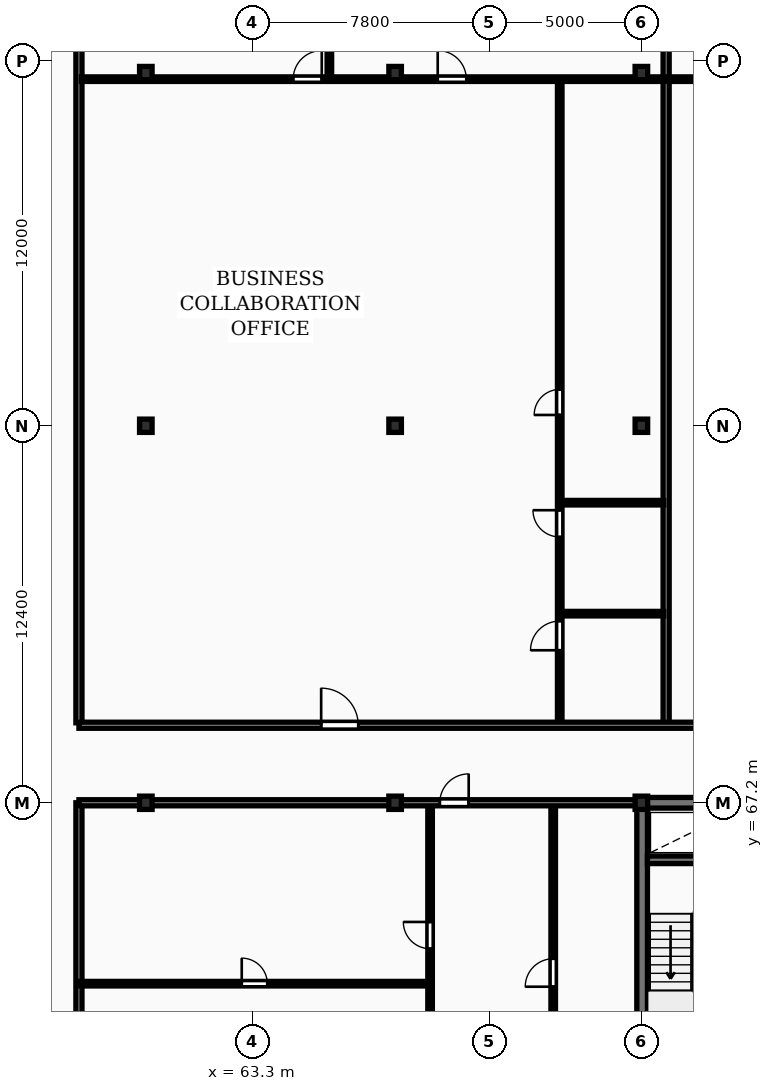
"""IFC4 building model, lengths in metres.
Left out: names, types, materials, properties, quantities, classifications, styles, units other than length and angle.
Written with IfcOpenShell. Run it as: python <this file> out.ifc"""

import sys

from ifc_helpers import new_model, si_unit, direction, frame, frame_2d, origin, origin_2d, place, context, subcontext, project, spatial, rectangle, i_section, extrude, element, fill, save


model = new_model("IFC4")
c1 = context("Model", 3, precision=1e-05, world=origin(), true_north=direction((0.0, 1.0)))
c2 = subcontext(c1, "Body", "Model", "MODEL_VIEW")
j1 = project(units=[si_unit("LENGTHUNIT", "METRE"), si_unit("PLANEANGLEUNIT", "RADIAN")], contexts=[c1])
p1 = place(None, origin())
s1 = spatial("IfcSite", under=j1, at=p1, CompositionType="ELEMENT")
p2 = place(p1, origin())
s2 = spatial("IfcBuilding", under=s1, at=p2, CompositionType="ELEMENT")
p3 = place(p2, frame((0.0, 0.0, 139.3)))
s3 = spatial("IfcBuildingStorey", under=s2, at=p3, CompositionType="ELEMENT", Elevation=139.3)
for number, where, z_axis, x_axis in (
    (1, (59.8, 67.2, 0.0), (0.0, 0.0, 1.0), (1.0, 0.0, 0.0)),
    (2, (59.8, 79.6, 0.0), (0.0, 0.0, 1.0), (1.0, 0.0, 0.0)),
    (3, (59.8, 91.2, 0.0), (0.0, 0.0, 1.0), (1.0, 0.0, 0.0)),
    (4, (68.0, 67.2, 0.0), (0.0, 0.0, 1.0), (1.0, 0.0, 0.0)),
    (5, (68.0, 79.6, 0.0), (0.0, 0.0, 1.0), (1.0, 0.0, 0.0)),
    (6, (68.0, 91.2, 0.0), (0.0, 0.0, 1.0), (1.0, 0.0, 0.0)),
    (7, (76.1, 67.2, 0.0), (0.0, 0.0, 1.0), (1.0, 0.0, 0.0)),
    (8, (76.1, 79.6, 0.0), (0.0, 0.0, 1.0), (1.0, 0.0, 0.0)),
    (9, (76.1, 91.2, 0.0), (0.0, 0.0, 1.0), (1.0, 0.0, 0.0)),
):
    element("IfcColumn", number, at=place(p3, frame(where, z_axis=z_axis, x_axis=x_axis)), inside=s3, PredefinedType="COLUMN", context=c2, shape_type="SweptSolid", body=[
        extrude(i_section(OverallWidth=0.412, OverallDepth=0.437, WebThickness=0.036, FlangeThickness=0.052, FilletRadius=0.015, at=origin_2d()), origin(), (0.0, 0.0, 1.0), 3.6),
    ])
p4 = place(p3, frame((76.125, 55.375, 0.0), z_axis=(0.0, 0.0, 1.0), x_axis=(0.0, 1.0, 0.0)))
e10 = element("IfcWall", 10, at=p4, inside=s3, PredefinedType="SHEAR", context=c2, shape_type="SweptSolid", body=[
    extrude(rectangle(XDim=11.65, YDim=0.35, at=frame_2d((5.825, 0.0))), origin(), (0.0, 0.0, 1.0), 3.6),
])
p5 = place(p3, frame((75.95, 67.2, 0.0), z_axis=(0.0, 0.0, 1.0), x_axis=(1.0, 0.0, 0.0)))
e11 = element("IfcWall", 11, at=p5, inside=s3, PredefinedType="SHEAR", context=c2, shape_type="SweptSolid", body=[
    extrude(rectangle(XDim=36.3, YDim=0.35, at=frame_2d((18.15, 0.0))), origin(), (0.0, 0.0, 1.0), 3.6),
])
p6 = place(p5, frame((5.25, 0.0, 0.0)))
e12 = element("IfcOpeningElement", 12, at=p6, cuts=e11, PredefinedType="OPENING", context=c2, shape_type="SweptSolid", body=[
    extrude(rectangle(XDim=1.0, YDim=2.15, at=frame_2d((0.5, 1.075))), frame((0.0, 0.185, 0.0), z_axis=(0.0, -1.0, 0.0), x_axis=(1.0, 0.0, 0.0)), (0.0, 0.0, 1.0), 0.37),
])
p7 = place(p5, frame((21.6, 0.0, 0.0)))
e13 = element("IfcOpeningElement", 13, at=p7, cuts=e11, PredefinedType="OPENING", context=c2, shape_type="SweptSolid", body=[
    extrude(rectangle(XDim=1.5, YDim=2.2, at=frame_2d((0.75, 1.1))), frame((0.0, 0.185, 0.0), z_axis=(0.0, -1.0, 0.0), x_axis=(1.0, 0.0, 0.0)), (0.0, 0.0, 1.0), 0.37),
])
p8 = place(p5, frame((30.45, 0.0, 0.0)))
e14 = element("IfcOpeningElement", 14, at=p8, cuts=e11, PredefinedType="OPENING", context=c2, shape_type="SweptSolid", body=[
    extrude(rectangle(XDim=1.0, YDim=2.15, at=frame_2d((0.5, 1.075))), frame((0.0, 0.185, 0.0), z_axis=(0.0, -1.0, 0.0), x_axis=(1.0, 0.0, 0.0)), (0.0, 0.0, 1.0), 0.37),
])
p9 = place(p3, frame((76.3, 65.325, 0.0), z_axis=(0.0, 0.0, 1.0), x_axis=(1.0, 0.0, 0.0)))
e15 = element("IfcWall", 15, at=p9, inside=s3, PredefinedType="SHEAR", context=c2, shape_type="SweptSolid", body=[
    extrude(rectangle(XDim=3.24, YDim=0.25, at=frame_2d((1.62, 0.0))), origin(), (0.0, 0.0, 1.0), 3.6),
])
p10 = place(p3, frame((57.6, 51.1, 0.0), z_axis=(0.0, 0.0, 1.0), x_axis=(0.0, 1.0, 0.0)))
e16 = element("IfcWall", 16, at=p10, inside=s3, PredefinedType="PARTITIONING", context=c2, shape_type="SweptSolid", body=[
    extrude(rectangle(XDim=16.1, YDim=0.2, at=frame_2d((8.05, 0.0))), origin(), (0.0, 0.0, 1.0), 3.31),
])
p11 = place(p3, frame((57.6, 61.25, 0.0), z_axis=(0.0, 0.0, 1.0), x_axis=(1.0, 0.0, 0.0)))
e17 = element("IfcWall", 17, at=p11, inside=s3, PredefinedType="PARTITIONING", context=c2, shape_type="SweptSolid", body=[
    extrude(rectangle(XDim=11.55, YDim=0.15, at=frame_2d((5.775, 0.0))), origin(), (0.0, 0.0, 1.0), 3.31),
])
p12 = place(p11, frame((5.355, 0.0, 0.0)))
e18 = element("IfcOpeningElement", 18, at=p12, cuts=e17, PredefinedType="OPENING", context=c2, shape_type="SweptSolid", body=[
    extrude(rectangle(XDim=0.84, YDim=2.04, at=frame_2d((0.42, 1.02))), frame((0.0, 0.085, 0.0), z_axis=(0.0, -1.0, 0.0), x_axis=(1.0, 0.0, 0.0)), (0.0, 0.0, 1.0), 0.17),
])
p13 = place(p3, frame((69.15, 51.1, 0.0), z_axis=(0.0, 0.0, 1.0), x_axis=(0.0, 1.0, 0.0)))
e19 = element("IfcWall", 19, at=p13, inside=s3, PredefinedType="PARTITIONING", context=c2, shape_type="SweptSolid", body=[
    extrude(rectangle(XDim=16.05, YDim=0.15, at=frame_2d((8.025, 0.0))), origin(), (0.0, 0.0, 1.0), 3.31),
])
p14 = place(p13, frame((11.3, 0.0, 0.0)))
e20 = element("IfcOpeningElement", 20, at=p14, cuts=e19, PredefinedType="OPENING", context=c2, shape_type="SweptSolid", body=[
    extrude(rectangle(XDim=0.88, YDim=2.06, at=frame_2d((0.44, 1.03))), frame((0.0, 0.085, 0.0), z_axis=(0.0, -1.0, 0.0), x_axis=(1.0, 0.0, 0.0)), (0.0, 0.0, 1.0), 0.17),
])
p15 = place(p3, frame((73.2, 56.07, 0.0), z_axis=(0.0, 0.0, 1.0), x_axis=(0.0, 1.0, 0.0)))
e21 = element("IfcWall", 21, at=p15, inside=s3, PredefinedType="PARTITIONING", context=c2, shape_type="SweptSolid", body=[
    extrude(rectangle(XDim=11.08, YDim=0.15, at=frame_2d((5.54, 0.0))), origin(), (0.0, 0.0, 1.0), 3.31),
])
p16 = place(p15, frame((5.08, 0.0, 0.0)))
e22 = element("IfcOpeningElement", 22, at=p16, cuts=e21, PredefinedType="OPENING", context=c2, shape_type="SweptSolid", body=[
    extrude(rectangle(XDim=0.92, YDim=2.08, at=frame_2d((0.46, 1.04))), frame((0.0, 0.085, 0.0), z_axis=(0.0, -1.0, 0.0), x_axis=(1.0, 0.0, 0.0)), (0.0, 0.0, 1.0), 0.17),
])
p17 = place(p3, frame((57.6, 67.2, 0.0), z_axis=(0.0, 0.0, 1.0), x_axis=(1.0, 0.0, 0.0)))
e23 = element("IfcWall", 23, at=p17, inside=s3, PredefinedType="PARTITIONING", context=c2, shape_type="SweptSolid", body=[
    extrude(rectangle(XDim=18.35, YDim=0.2, at=frame_2d((9.175, 0.0))), origin(), (0.0, 0.0, 1.0), 2.773),
])
p18 = place(p17, frame((11.87, 0.0, 0.0)))
e24 = element("IfcOpeningElement", 24, at=p18, cuts=e23, PredefinedType="OPENING", context=c2, shape_type="SweptSolid", body=[
    extrude(rectangle(XDim=0.95, YDim=2.15, at=frame_2d((0.475, 1.075))), frame((0.0, 0.11, 0.0), z_axis=(0.0, -1.0, 0.0), x_axis=(1.0, 0.0, 0.0)), (0.0, 0.0, 1.0), 0.22),
])
for number, where, z_axis, x_axis in (
    (25, (57.6, 69.83, 0.0), (0.0, 0.0, 1.0), (0.0, 1.0, 0.0)),
    (26, (76.914, 69.83, 0.0), (0.0, 0.0, 1.0), (0.0, 1.0, 0.0)),
):
    element("IfcWall", number, at=place(p3, frame(where, z_axis=z_axis, x_axis=x_axis)), inside=s3, PredefinedType="PARTITIONING", context=c2, shape_type="SweptSolid", body=[
        extrude(rectangle(XDim=26.07, YDim=0.2, at=frame_2d((13.035, 0.0))), origin(), (0.0, 0.0, 1.0), 3.31),
    ])
for number, where, z_axis, x_axis in (
    (27, (73.474, 73.42, 0.0), (0.0, 0.0, 1.0), (1.0, 0.0, 0.0)),
    (28, (73.474, 77.07, 0.0), (0.0, 0.0, 1.0), (1.0, 0.0, 0.0)),
):
    element("IfcWall", number, at=place(p3, frame(where, z_axis=z_axis, x_axis=x_axis)), inside=s3, PredefinedType="PARTITIONING", context=c2, shape_type="SweptSolid", body=[
        extrude(rectangle(XDim=3.36, YDim=0.15, at=frame_2d((1.68, 0.0))), origin(), (0.0, 0.0, 1.0), 3.31),
    ])
p19 = place(p3, frame((73.414, 69.81, 0.0), z_axis=(0.0, 0.0, 1.0), x_axis=(0.0, 1.0, 0.0)))
e29 = element("IfcWall", 29, at=p19, inside=s3, PredefinedType="PARTITIONING", context=c2, shape_type="SweptSolid", body=[
    extrude(rectangle(XDim=21.13, YDim=0.15, at=frame_2d((10.565, 0.0))), origin(), (0.0, 0.0, 1.0), 3.31),
])
p20 = place(p19, frame((2.406, 0.0, 0.0)))
e30 = element("IfcOpeningElement", 30, at=p20, cuts=e29, PredefinedType="OPENING", context=c2, shape_type="SweptSolid", body=[
    extrude(rectangle(XDim=0.96, YDim=2.1, at=frame_2d((0.48, 1.05))), frame((0.0, 0.085, 0.0), z_axis=(0.0, -1.0, 0.0), x_axis=(1.0, 0.0, 0.0)), (0.0, 0.0, 1.0), 0.17),
])
p21 = place(p19, frame((6.133, 0.0, 0.0)))
e31 = element("IfcOpeningElement", 31, at=p21, cuts=e29, PredefinedType="OPENING", context=c2, shape_type="SweptSolid", body=[
    extrude(rectangle(XDim=0.88, YDim=2.06, at=frame_2d((0.44, 1.03))), frame((0.0, 0.085, 0.0), z_axis=(0.0, -1.0, 0.0), x_axis=(1.0, 0.0, 0.0)), (0.0, 0.0, 1.0), 0.17),
])
p22 = place(p19, frame((10.145, 0.0, 0.0)))
e32 = element("IfcOpeningElement", 32, at=p22, cuts=e29, PredefinedType="OPENING", context=c2, shape_type="SweptSolid", body=[
    extrude(rectangle(XDim=0.84, YDim=2.04, at=frame_2d((0.42, 1.02))), frame((0.0, 0.085, 0.0), z_axis=(0.0, -1.0, 0.0), x_axis=(1.0, 0.0, 0.0)), (0.0, 0.0, 1.0), 0.17),
])
p23 = place(p3, frame((65.837, 91.08, 0.0), z_axis=(0.0, 0.0, 1.0), x_axis=(0.0, 1.0, 0.0)))
e33 = element("IfcWall", 33, at=p23, inside=s3, PredefinedType="PARTITIONING", context=c2, shape_type="SweptSolid", body=[
    extrude(rectangle(XDim=4.82, YDim=0.15, at=frame_2d((2.41, 0.0))), origin(), (0.0, 0.0, 1.0), 3.31),
])
p24 = place(p3, frame((57.68, 91.0, 0.0), z_axis=(0.0, 0.0, 1.0), x_axis=(1.0, 0.0, 0.0)))
e34 = element("IfcWall", 34, at=p24, inside=s3, PredefinedType="PARTITIONING", context=c2, shape_type="SweptSolid", body=[
    extrude(rectangle(XDim=19.154, YDim=0.15, at=frame_2d((9.577, 0.0))), origin(), (0.0, 0.0, 1.0), 3.003),
])
p25 = place(p24, frame((6.967, 0.0, 0.0)))
e35 = element("IfcOpeningElement", 35, at=p25, cuts=e34, PredefinedType="OPENING", context=c2, shape_type="SweptSolid", body=[
    extrude(rectangle(XDim=0.94, YDim=2.1, at=frame_2d((0.47, 1.05))), frame((0.0, 0.085, 0.0), z_axis=(0.0, -1.0, 0.0), x_axis=(1.0, 0.0, 0.0)), (0.0, 0.0, 1.0), 0.17),
])
p26 = place(p24, frame((11.721, 0.0, 0.0)))
e36 = element("IfcOpeningElement", 36, at=p26, cuts=e34, PredefinedType="OPENING", context=c2, shape_type="SweptSolid", body=[
    extrude(rectangle(XDim=0.94, YDim=2.1, at=frame_2d((0.47, 1.05))), frame((0.0, 0.085, 0.0), z_axis=(0.0, -1.0, 0.0), x_axis=(1.0, 0.0, 0.0)), (0.0, 0.0, 1.0), 0.17),
])
p27 = place(p3, frame((76.994, 91.0, 0.0), z_axis=(0.0, 0.0, 1.0), x_axis=(1.0, 0.0, 0.0)))
e37 = element("IfcWall", 37, at=p27, inside=s3, PredefinedType="PARTITIONING", context=c2, shape_type="SweptSolid", body=[
    extrude(rectangle(XDim=20.947, YDim=0.15, at=frame_2d((10.474, 0.0))), origin(), (0.0, 0.0, 1.0), 3.003),
])
p28 = place(p27, frame((5.042, 0.0, 0.0)))
e38 = element("IfcOpeningElement", 38, at=p28, cuts=e37, PredefinedType="OPENING", context=c2, shape_type="SweptSolid", body=[
    extrude(rectangle(XDim=0.94, YDim=2.1, at=frame_2d((0.47, 1.05))), frame((0.0, 0.085, 0.0), z_axis=(0.0, -1.0, 0.0), x_axis=(1.0, 0.0, 0.0)), (0.0, 0.0, 1.0), 0.17),
])
p29 = place(p27, frame((10.004, 0.0, 0.0)))
e39 = element("IfcOpeningElement", 39, at=p29, cuts=e37, PredefinedType="OPENING", context=c2, shape_type="SweptSolid", body=[
    extrude(rectangle(XDim=0.94, YDim=2.1, at=frame_2d((0.47, 1.05))), frame((0.0, 0.085, 0.0), z_axis=(0.0, -1.0, 0.0), x_axis=(1.0, 0.0, 0.0)), (0.0, 0.0, 1.0), 0.17),
])
p30 = place(p3, frame((57.6, 69.75, 0.0), z_axis=(0.0, 0.0, 1.0), x_axis=(1.0, 0.0, 0.0)))
e40 = element("IfcWall", 40, at=p30, inside=s3, PredefinedType="PARTITIONING", context=c2, shape_type="SweptSolid", body=[
    extrude(rectangle(XDim=73.0, YDim=0.2, at=frame_2d((36.5, 0.0))), origin(), (0.0, 0.0, 1.0), 3.31),
])
p31 = place(p30, frame((7.967, 0.0, 0.0)))
e41 = element("IfcOpeningElement", 41, at=p31, cuts=e40, PredefinedType="OPENING", context=c2, shape_type="SweptSolid", body=[
    extrude(rectangle(XDim=1.22, YDim=2.18, at=frame_2d((0.61, 1.09))), frame((0.0, 0.11, 0.0), z_axis=(0.0, -1.0, 0.0), x_axis=(1.0, 0.0, 0.0)), (0.0, 0.0, 1.0), 0.22),
])
p32 = place(p30, frame((28.293, 0.0, 0.0)))
e42 = element("IfcOpeningElement", 42, at=p32, cuts=e40, PredefinedType="OPENING", context=c2, shape_type="SweptSolid", body=[
    extrude(rectangle(XDim=1.22, YDim=2.18, at=frame_2d((0.61, 1.09))), frame((0.0, 0.11, 0.0), z_axis=(0.0, -1.0, 0.0), x_axis=(1.0, 0.0, 0.0)), (0.0, 0.0, 1.0), 0.22),
])
p33 = place(p30, frame((42.466, 0.0, 0.0)))
e43 = element("IfcOpeningElement", 43, at=p33, cuts=e40, PredefinedType="OPENING", context=c2, shape_type="SweptSolid", body=[
    extrude(rectangle(XDim=0.95, YDim=2.15, at=frame_2d((0.475, 1.075))), frame((0.0, 0.11, 0.0), z_axis=(0.0, -1.0, 0.0), x_axis=(1.0, 0.0, 0.0)), (0.0, 0.0, 1.0), 0.22),
])
p34 = place(p30, frame((60.738, 0.0, 0.0)))
e44 = element("IfcOpeningElement", 44, at=p34, cuts=e40, PredefinedType="OPENING", context=c2, shape_type="SweptSolid", body=[
    extrude(rectangle(XDim=0.95, YDim=2.15, at=frame_2d((0.475, 1.075))), frame((0.0, 0.11, 0.0), z_axis=(0.0, -1.0, 0.0), x_axis=(1.0, 0.0, 0.0)), (0.0, 0.0, 1.0), 0.22),
])
p35 = place(p12, origin())
e45 = element("IfcDoor", 45, at=p35, inside=s3, OperationType="SINGLE_SWING_LEFT", PredefinedType="DOOR", context=c2, shape_type="SweptSolid", body=[
    extrude(rectangle(XDim=0.84, YDim=2.04, at=frame_2d((0.42, 1.02))), frame((0.0, 0.025, 0.0), z_axis=(0.0, -1.0, 0.0), x_axis=(1.0, 0.0, 0.0)), (0.0, 0.0, 1.0), 0.05),
])
fill(e18, e45)
p36 = place(p14, origin())
e46 = element("IfcDoor", 46, at=p36, inside=s3, OperationType="SINGLE_SWING_RIGHT", PredefinedType="DOOR", context=c2, shape_type="SweptSolid", body=[
    extrude(rectangle(XDim=0.88, YDim=2.06, at=frame_2d((0.44, 1.03))), frame((0.0, 0.025, 0.0), z_axis=(0.0, -1.0, 0.0), x_axis=(1.0, 0.0, 0.0)), (0.0, 0.0, 1.0), 0.05),
])
fill(e20, e46)
p37 = place(p16, origin())
e47 = element("IfcDoor", 47, at=p37, inside=s3, OperationType="SINGLE_SWING_LEFT", PredefinedType="DOOR", context=c2, shape_type="SweptSolid", body=[
    extrude(rectangle(XDim=0.92, YDim=2.08, at=frame_2d((0.46, 1.04))), frame((0.0, 0.025, 0.0), z_axis=(0.0, -1.0, 0.0), x_axis=(1.0, 0.0, 0.0)), (0.0, 0.0, 1.0), 0.05),
])
fill(e22, e47)
p38 = place(p18, origin())
e48 = element("IfcDoor", 48, at=p38, inside=s3, OperationType="SINGLE_SWING_RIGHT", PredefinedType="DOOR", context=c2, shape_type="SweptSolid", body=[
    extrude(rectangle(XDim=0.95, YDim=2.15, at=frame_2d((0.475, 1.075))), frame((0.0, 0.025, 0.0), z_axis=(0.0, -1.0, 0.0), x_axis=(1.0, 0.0, 0.0)), (0.0, 0.0, 1.0), 0.05),
])
fill(e24, e48)
p39 = place(p20, origin())
e49 = element("IfcDoor", 49, at=p39, inside=s3, OperationType="SINGLE_SWING_LEFT", PredefinedType="DOOR", context=c2, shape_type="SweptSolid", body=[
    extrude(rectangle(XDim=0.96, YDim=2.1, at=frame_2d((0.48, 1.05))), frame((0.0, 0.025, 0.0), z_axis=(0.0, -1.0, 0.0), x_axis=(1.0, 0.0, 0.0)), (0.0, 0.0, 1.0), 0.05),
])
fill(e30, e49)
p40 = place(p21, origin())
e50 = element("IfcDoor", 50, at=p40, inside=s3, OperationType="SINGLE_SWING_RIGHT", PredefinedType="DOOR", context=c2, shape_type="SweptSolid", body=[
    extrude(rectangle(XDim=0.88, YDim=2.06, at=frame_2d((0.44, 1.03))), frame((0.0, 0.025, 0.0), z_axis=(0.0, -1.0, 0.0), x_axis=(1.0, 0.0, 0.0)), (0.0, 0.0, 1.0), 0.05),
])
fill(e31, e50)
p41 = place(p22, origin())
e51 = element("IfcDoor", 51, at=p41, inside=s3, OperationType="SINGLE_SWING_LEFT", PredefinedType="DOOR", context=c2, shape_type="SweptSolid", body=[
    extrude(rectangle(XDim=0.84, YDim=2.04, at=frame_2d((0.42, 1.02))), frame((0.0, 0.025, 0.0), z_axis=(0.0, -1.0, 0.0), x_axis=(1.0, 0.0, 0.0)), (0.0, 0.0, 1.0), 0.05),
])
fill(e32, e51)
p42 = place(p25, origin())
e52 = element("IfcDoor", 52, at=p42, inside=s3, OperationType="SINGLE_SWING_RIGHT", PredefinedType="DOOR", context=c2, shape_type="SweptSolid", body=[
    extrude(rectangle(XDim=0.94, YDim=2.1, at=frame_2d((0.47, 1.05))), frame((0.0, 0.025, 0.0), z_axis=(0.0, -1.0, 0.0), x_axis=(1.0, 0.0, 0.0)), (0.0, 0.0, 1.0), 0.05),
])
fill(e35, e52)
p43 = place(p26, origin())
e53 = element("IfcDoor", 53, at=p43, inside=s3, OperationType="SINGLE_SWING_LEFT", PredefinedType="DOOR", context=c2, shape_type="SweptSolid", body=[
    extrude(rectangle(XDim=0.94, YDim=2.1, at=frame_2d((0.47, 1.05))), frame((0.0, 0.025, 0.0), z_axis=(0.0, -1.0, 0.0), x_axis=(1.0, 0.0, 0.0)), (0.0, 0.0, 1.0), 0.05),
])
fill(e36, e53)
p44 = place(p31, origin())
e54 = element("IfcDoor", 54, at=p44, inside=s3, OperationType="SINGLE_SWING_LEFT", PredefinedType="DOOR", context=c2, shape_type="SweptSolid", body=[
    extrude(rectangle(XDim=1.22, YDim=2.18, at=frame_2d((0.61, 1.09))), frame((0.0, 0.025, 0.0), z_axis=(0.0, -1.0, 0.0), x_axis=(1.0, 0.0, 0.0)), (0.0, 0.0, 1.0), 0.05),
])
fill(e41, e54)
save(model, sys.argv[1])
